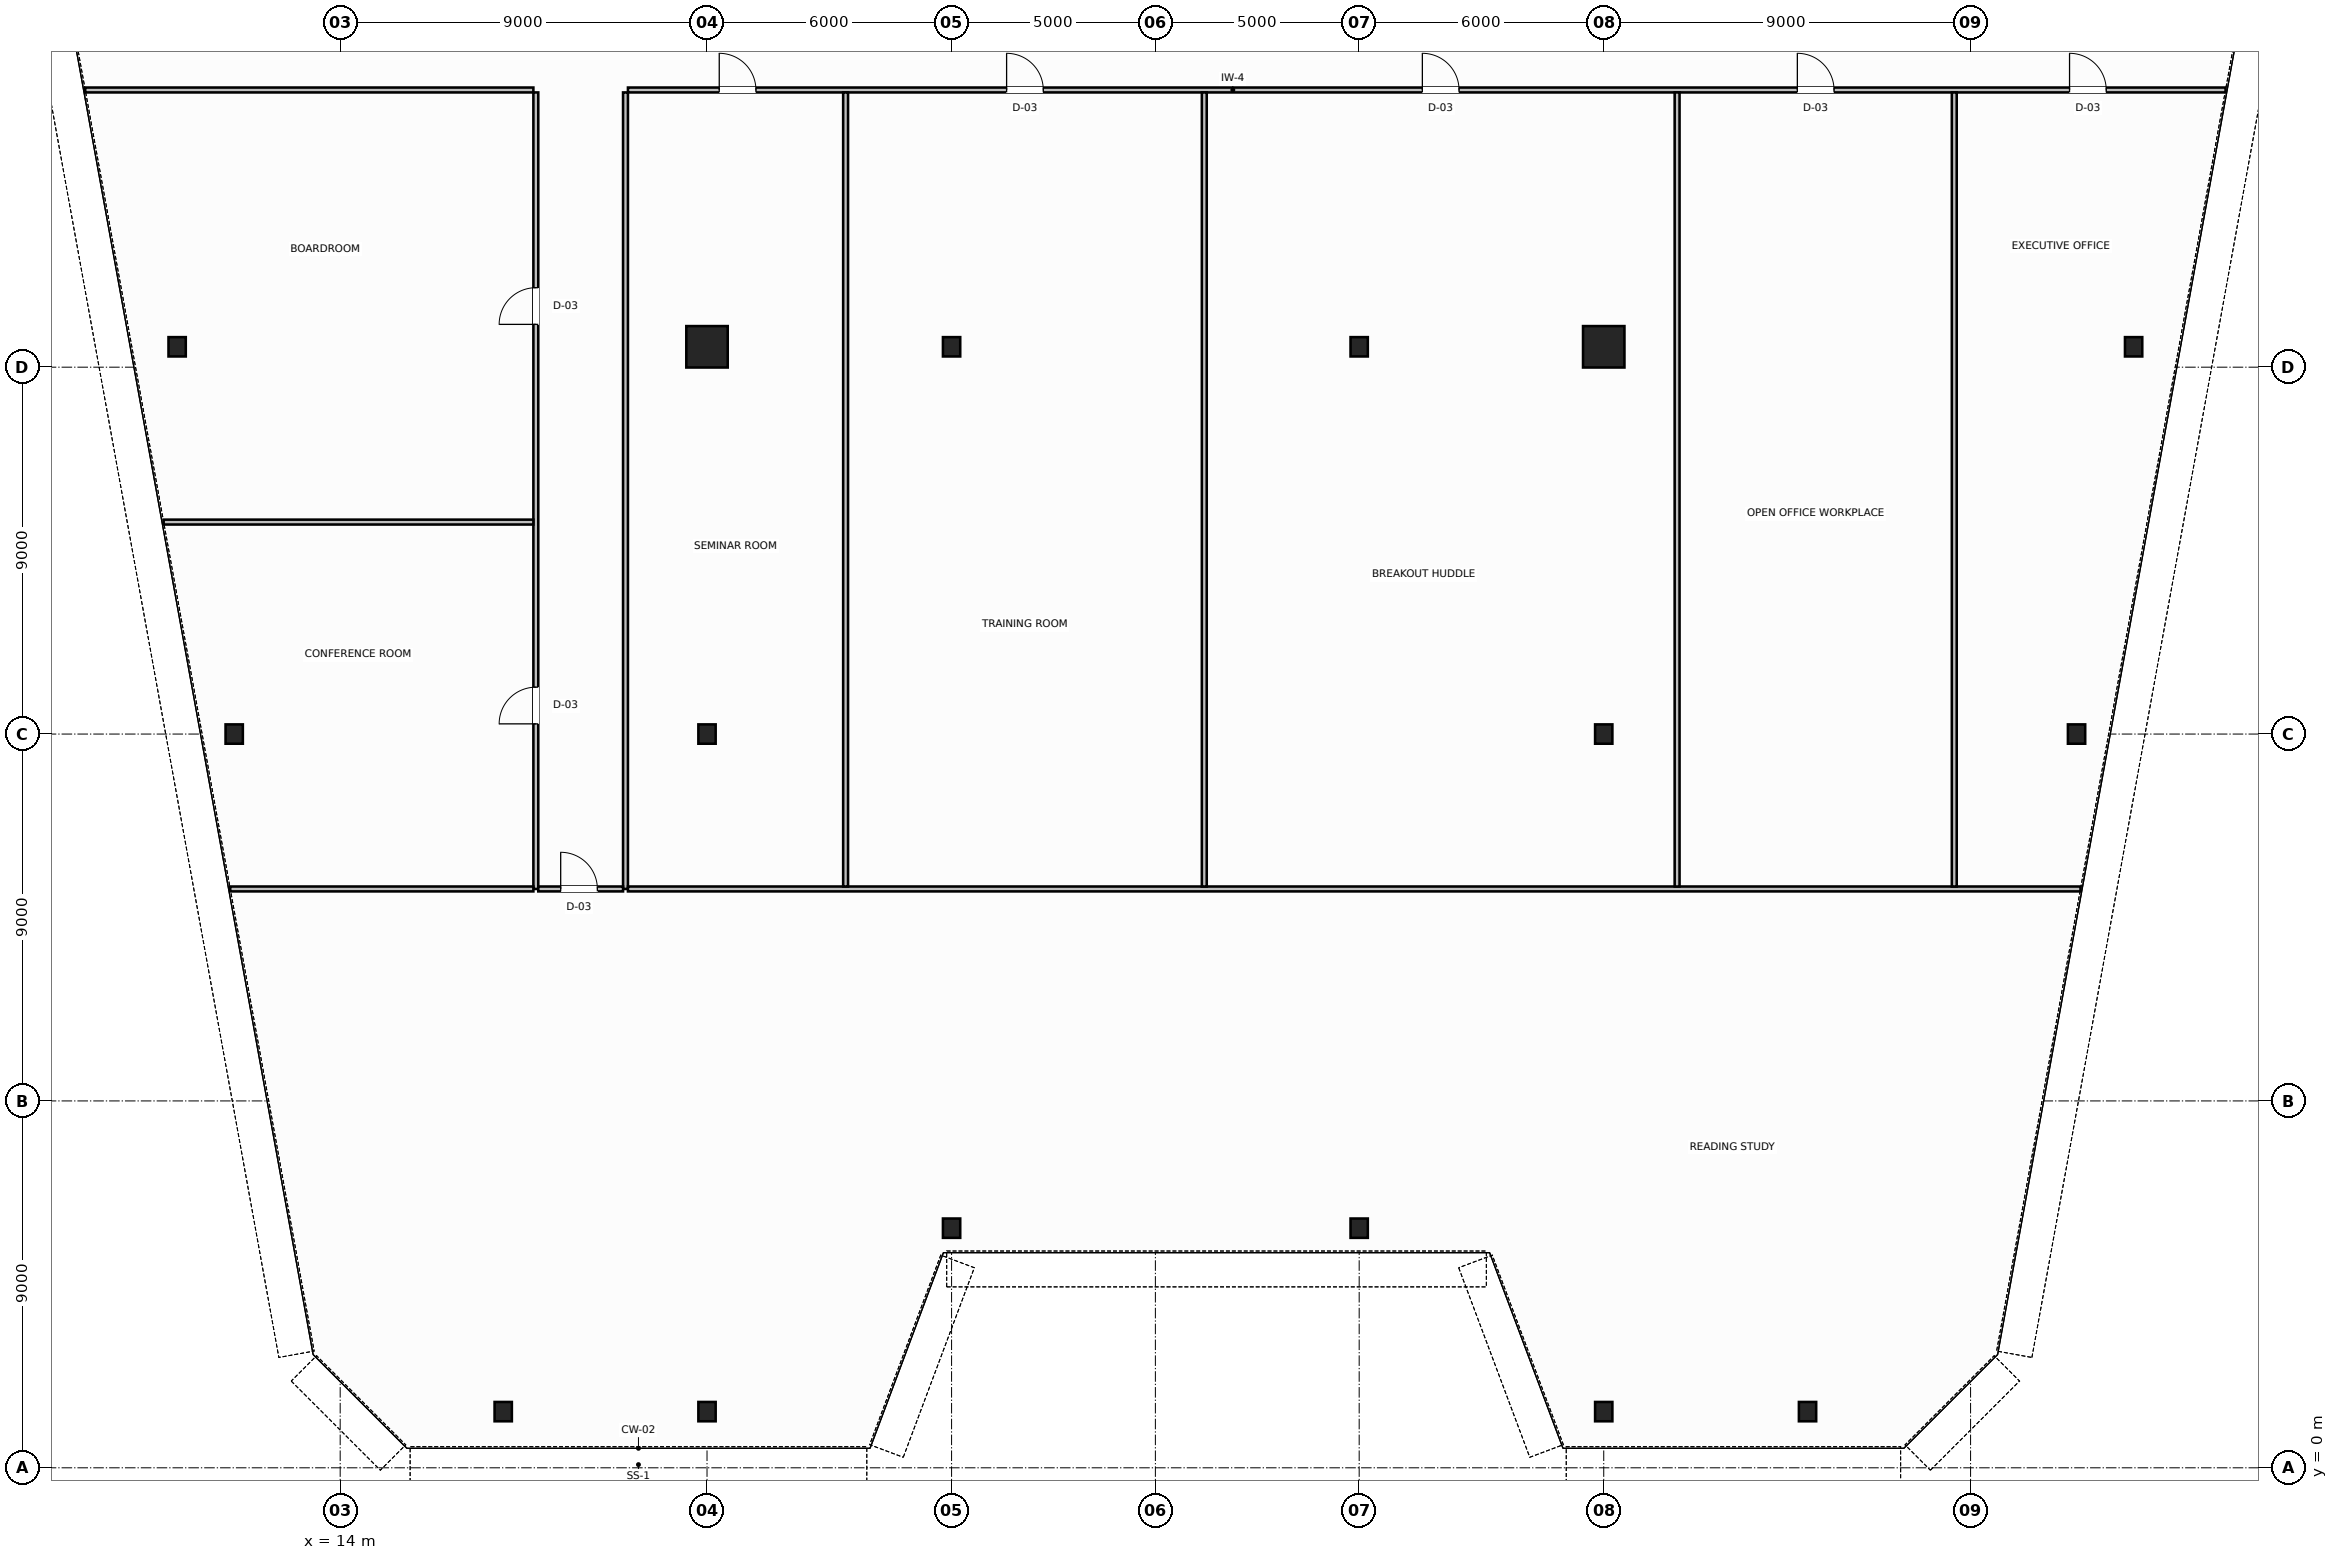
"""IFC4 building model, lengths in metres.
Left out: names, types, materials, properties, quantities, classifications, styles, units other than length and angle.
Written with IfcOpenShell. Run it as: python <this file> out.ifc"""

import sys

from ifc_helpers import new_model, si_unit, direction, frame, frame_2d, origin, origin_2d, place, context, subcontext, project, spatial, rectangle, hollow_circle, i_section, extrude, source, transform, mapped, element, fill, save


model = new_model("IFC4")
c1 = context("Model", 3, precision=1e-05, world=origin(), true_north=direction((0.0, 1.0)))
c2 = subcontext(c1, "Body", "Model", "MODEL_VIEW")
j1 = project(units=[si_unit("LENGTHUNIT", "METRE"), si_unit("PLANEANGLEUNIT", "RADIAN")], contexts=[c1])
p1 = place(None, origin())
s1 = spatial("IfcSite", under=j1, at=p1, CompositionType="ELEMENT")
p2 = place(p1, origin())
s2 = spatial("IfcBuilding", under=s1, at=p2, CompositionType="ELEMENT")
p3 = place(p2, frame((0.0, 0.0, 137.6)))
s3 = spatial("IfcBuildingStorey", under=s2, at=p3, CompositionType="ELEMENT", Elevation=137.6)
m1 = source(origin(), c2, "Body", "SweptSolid", [
    extrude(i_section(OverallWidth=0.424, OverallDepth=0.474, WebThickness=0.047, FlangeThickness=0.065, FilletRadius=0.015, at=origin_2d()), origin(), (0.0, 0.0, 1.0), 3.8),
])
for number, where, z_axis, x_axis in (
    (1, (10.0, 27.5, 0.0), (0.0, 0.0, 1.0), (1.0, 0.0, 0.0)),
    (2, (11.4, 18.0, 0.0), (0.0, 0.0, 1.0), (1.0, 0.0, 0.0)),
    (3, (58.0, 27.5, 0.0), (0.0, 0.0, 1.0), (1.0, 0.0, 0.0)),
    (4, (56.6, 18.0, 0.0), (0.0, 0.0, 1.0), (1.0, 0.0, 0.0)),
):
    element("IfcColumn", number, at=place(p3, frame(where, z_axis=z_axis, x_axis=x_axis)), inside=s3, PredefinedType="COLUMN", context=c2, shape_type="MappedRepresentation", body=[
        mapped(m1, transform((0.0, 0.0, 0.0), scale=1.0)),
    ])
m2 = source(origin(), c2, "Body", "SweptSolid", [
    extrude(hollow_circle(Radius=0.508, WallThickness=0.045, at=origin_2d()), origin(), (0.0, 0.0, 1.0), 3.8),
])
p4 = place(p3, frame((23.0, 27.5, 0.0), z_axis=(0.0, 0.0, 1.0), x_axis=(1.0, 0.0, 0.0)))
e5 = element("IfcColumn", 5, at=p4, inside=s3, PredefinedType="COLUMN", context=c2, shape_type="MappedRepresentation", body=[
    mapped(m2, transform((0.0, 0.0, 0.0), scale=1.0)),
])
m3 = source(origin(), c2, "Body", "SweptSolid", [
    extrude(i_section(OverallWidth=0.424, OverallDepth=0.474, WebThickness=0.047, FlangeThickness=0.065, FilletRadius=0.015, at=origin_2d()), origin(), (0.0, 0.0, 1.0), 3.8),
])
for number, where, z_axis, x_axis in (
    (6, (29.0, 27.5, 0.0), (0.0, 0.0, 1.0), (1.0, 0.0, 0.0)),
    (7, (39.0, 27.5, 0.0), (0.0, 0.0, 1.0), (1.0, 0.0, 0.0)),
):
    element("IfcColumn", number, at=place(p3, frame(where, z_axis=z_axis, x_axis=x_axis)), inside=s3, PredefinedType="COLUMN", context=c2, shape_type="MappedRepresentation", body=[
        mapped(m3, transform((0.0, 0.0, 0.0), scale=1.0)),
    ])
p5 = place(p3, frame((45.0, 27.5, 0.0), z_axis=(0.0, 0.0, 1.0), x_axis=(1.0, 0.0, 0.0)))
e8 = element("IfcColumn", 8, at=p5, inside=s3, PredefinedType="COLUMN", context=c2, shape_type="MappedRepresentation", body=[
    mapped(m2, transform((0.0, 0.0, 0.0), scale=1.0)),
])
for number, where, z_axis, x_axis in (
    (9, (23.0, 18.0, 0.0), (0.0, 0.0, 1.0), (1.0, 0.0, 0.0)),
    (10, (45.0, 18.0, 0.0), (0.0, 0.0, 1.0), (1.0, 0.0, 0.0)),
):
    element("IfcColumn", number, at=place(p3, frame(where, z_axis=z_axis, x_axis=x_axis)), inside=s3, PredefinedType="COLUMN", context=c2, shape_type="MappedRepresentation", body=[
        mapped(m3, transform((0.0, 0.0, 0.0), scale=1.0)),
    ])
m4 = source(origin(), c2, "Body", "SweptSolid", [
    extrude(i_section(OverallWidth=0.424, OverallDepth=0.474, WebThickness=0.047, FlangeThickness=0.065, FilletRadius=0.015, at=origin_2d()), origin(), (0.0, 0.0, 1.0), 3.743),
])
for number, where, z_axis, x_axis in (
    (11, (18.0, 1.378, 0.032), (0.0, -0.064, 0.998), (1.0, 0.0, 0.0)),
    (12, (23.0, 1.378, 0.032), (0.0, -0.064, 0.998), (1.0, 0.0, 0.0)),
    (13, (29.0, 5.878, 0.032), (0.0, -0.064, 0.998), (1.0, 0.0, 0.0)),
    (14, (39.0, 5.878, 0.032), (0.0, -0.064, 0.998), (1.0, 0.0, 0.0)),
    (15, (45.0, 1.378, 0.032), (0.0, -0.064, 0.998), (1.0, 0.0, 0.0)),
    (16, (50.0, 1.378, 0.032), (0.0, -0.064, 0.998), (1.0, 0.0, 0.0)),
):
    element("IfcColumn", number, at=place(p3, frame(where, z_axis=z_axis, x_axis=x_axis)), inside=s3, PredefinedType="COLUMN", context=c2, shape_type="MappedRepresentation", body=[
        mapped(m4, transform((0.0, 0.0, 0.0), scale=1.0)),
    ])
p6 = place(p3, frame((7.745, 33.8, 0.0), z_axis=(0.0, 0.0, 1.0), x_axis=(1.0, 0.0, 0.0)))
e17 = element("IfcWall", 17, at=p6, inside=s3, PredefinedType="PARTITIONING", context=c2, shape_type="SweptSolid", body=[
    extrude(rectangle(XDim=10.995, YDim=0.12, at=frame_2d((5.498, 0.0))), origin(), (0.0, 0.0, 1.0), 3.12),
])
p7 = place(p3, frame((21.06, 33.8, 0.0), z_axis=(0.0, 0.0, 1.0), x_axis=(1.0, 0.0, 0.0)))
e18 = element("IfcWall", 18, at=p7, inside=s3, PredefinedType="PARTITIONING", context=c2, shape_type="SweptSolid", body=[
    extrude(rectangle(XDim=39.195, YDim=0.12, at=frame_2d((19.598, 0.0))), origin(), (0.0, 0.0, 1.0), 3.12),
])
p8 = place(p7, frame((2.24, 0.0, 0.0)))
e19 = element("IfcOpeningElement", 19, at=p8, cuts=e18, PredefinedType="OPENING", context=c2, shape_type="SweptSolid", body=[
    extrude(rectangle(XDim=0.9, YDim=2.15, at=frame_2d((0.45, 1.075))), frame((0.0, 0.07, 0.0), z_axis=(0.0, -1.0, 0.0), x_axis=(1.0, 0.0, 0.0)), (0.0, 0.0, 1.0), 0.14),
])
p9 = place(p7, frame((9.29, 0.0, 0.0)))
e20 = element("IfcOpeningElement", 20, at=p9, cuts=e18, PredefinedType="OPENING", context=c2, shape_type="SweptSolid", body=[
    extrude(rectangle(XDim=0.9, YDim=2.15, at=frame_2d((0.45, 1.075))), frame((0.0, 0.07, 0.0), z_axis=(0.0, -1.0, 0.0), x_axis=(1.0, 0.0, 0.0)), (0.0, 0.0, 1.0), 0.14),
])
p10 = place(p7, frame((19.49, 0.0, 0.0)))
e21 = element("IfcOpeningElement", 21, at=p10, cuts=e18, PredefinedType="OPENING", context=c2, shape_type="SweptSolid", body=[
    extrude(rectangle(XDim=0.9, YDim=2.15, at=frame_2d((0.45, 1.075))), frame((0.0, 0.07, 0.0), z_axis=(0.0, -1.0, 0.0), x_axis=(1.0, 0.0, 0.0)), (0.0, 0.0, 1.0), 0.14),
])
p11 = place(p7, frame((28.69, 0.0, 0.0)))
e22 = element("IfcOpeningElement", 22, at=p11, cuts=e18, PredefinedType="OPENING", context=c2, shape_type="SweptSolid", body=[
    extrude(rectangle(XDim=0.9, YDim=2.15, at=frame_2d((0.45, 1.075))), frame((0.0, 0.07, 0.0), z_axis=(0.0, -1.0, 0.0), x_axis=(1.0, 0.0, 0.0)), (0.0, 0.0, 1.0), 0.14),
])
p12 = place(p7, frame((35.368, 0.0, 0.0)))
e23 = element("IfcOpeningElement", 23, at=p12, cuts=e18, PredefinedType="OPENING", context=c2, shape_type="SweptSolid", body=[
    extrude(rectangle(XDim=0.9, YDim=2.15, at=frame_2d((0.45, 1.075))), frame((0.0, 0.07, 0.0), z_axis=(0.0, -1.0, 0.0), x_axis=(1.0, 0.0, 0.0)), (0.0, 0.0, 1.0), 0.14),
])
p13 = place(p3, frame((18.8, 14.2, 0.0), z_axis=(0.0, 0.0, 1.0), x_axis=(0.0, 1.0, 0.0)))
e24 = element("IfcWall", 24, at=p13, inside=s3, PredefinedType="PARTITIONING", context=c2, shape_type="SweptSolid", body=[
    extrude(rectangle(XDim=19.54, YDim=0.12, at=frame_2d((9.77, 0.0))), origin(), (0.0, 0.0, 1.0), 3.58),
])
p14 = place(p13, frame((4.05, 0.0, 0.0)))
e25 = element("IfcOpeningElement", 25, at=p14, cuts=e24, PredefinedType="OPENING", context=c2, shape_type="SweptSolid", body=[
    extrude(rectangle(XDim=0.9, YDim=2.15, at=frame_2d((0.45, 1.075))), frame((0.0, 0.07, 0.0), z_axis=(0.0, -1.0, 0.0), x_axis=(1.0, 0.0, 0.0)), (0.0, 0.0, 1.0), 0.14),
])
p15 = place(p13, frame((13.85, 0.0, 0.0)))
e26 = element("IfcOpeningElement", 26, at=p15, cuts=e24, PredefinedType="OPENING", context=c2, shape_type="SweptSolid", body=[
    extrude(rectangle(XDim=0.9, YDim=2.15, at=frame_2d((0.45, 1.075))), frame((0.0, 0.07, 0.0), z_axis=(0.0, -1.0, 0.0), x_axis=(1.0, 0.0, 0.0)), (0.0, 0.0, 1.0), 0.14),
])
p16 = place(p3, frame((21.0, 14.2, 0.0), z_axis=(0.0, 0.0, 1.0), x_axis=(0.0, 1.0, 0.0)))
e27 = element("IfcWall", 27, at=p16, inside=s3, PredefinedType="PARTITIONING", context=c2, shape_type="SweptSolid", body=[
    extrude(rectangle(XDim=19.54, YDim=0.12, at=frame_2d((9.77, 0.0))), origin(), (0.0, 0.0, 1.0), 3.58),
])
p17 = place(p3, frame((18.86, 14.2, 0.0), z_axis=(0.0, 0.0, 1.0), x_axis=(1.0, 0.0, 0.0)))
e28 = element("IfcWall", 28, at=p17, inside=s3, PredefinedType="PARTITIONING", context=c2, shape_type="SweptSolid", body=[
    extrude(rectangle(XDim=2.08, YDim=0.12, at=frame_2d((1.04, 0.0))), origin(), (0.0, 0.0, 1.0), 3.58),
])
p18 = place(p17, frame((0.55, 0.0, 0.0)))
e29 = element("IfcOpeningElement", 29, at=p18, cuts=e28, PredefinedType="OPENING", context=c2, shape_type="SweptSolid", body=[
    extrude(rectangle(XDim=0.9, YDim=2.15, at=frame_2d((0.45, 1.075))), frame((0.0, 0.07, 0.0), z_axis=(0.0, -1.0, 0.0), x_axis=(1.0, 0.0, 0.0)), (0.0, 0.0, 1.0), 0.14),
])
p19 = place(p3, frame((11.303, 14.2, 0.0), z_axis=(0.0, 0.0, 1.0), x_axis=(1.0, 0.0, 0.0)))
e30 = element("IfcWall", 30, at=p19, inside=s3, PredefinedType="PARTITIONING", context=c2, shape_type="SweptSolid", body=[
    extrude(rectangle(XDim=7.437, YDim=0.12, at=frame_2d((3.719, 0.0))), origin(), (0.0, 0.0, 1.0), 3.58),
])
p20 = place(p3, frame((21.06, 14.2, 0.0), z_axis=(0.0, 0.0, 1.0), x_axis=(1.0, 0.0, 0.0)))
e31 = element("IfcWall", 31, at=p20, inside=s3, PredefinedType="PARTITIONING", context=c2, shape_type="SweptSolid", body=[
    extrude(rectangle(XDim=35.637, YDim=0.12, at=frame_2d((17.819, 0.0))), origin(), (0.0, 0.0, 1.0), 3.58),
])
p21 = place(p3, frame((9.669, 23.2, 0.0), z_axis=(0.0, 0.0, 1.0), x_axis=(1.0, 0.0, 0.0)))
e32 = element("IfcWall", 32, at=p21, inside=s3, PredefinedType="PARTITIONING", context=c2, shape_type="SweptSolid", body=[
    extrude(rectangle(XDim=9.071, YDim=0.12, at=frame_2d((4.536, 0.0))), origin(), (0.0, 0.0, 1.0), 3.58),
])
for number, where, z_axis, x_axis in (
    (33, (26.4, 14.26, 0.0), (0.0, 0.0, 1.0), (0.0, 1.0, 0.0)),
    (34, (35.2, 14.26, 0.0), (0.0, 0.0, 1.0), (0.0, 1.0, 0.0)),
    (35, (46.8, 14.26, 0.0), (0.0, 0.0, 1.0), (0.0, 1.0, 0.0)),
    (36, (53.6, 14.26, 0.0), (0.0, 0.0, 1.0), (0.0, 1.0, 0.0)),
):
    element("IfcWall", number, at=place(p3, frame(where, z_axis=z_axis, x_axis=x_axis)), inside=s3, PredefinedType="PARTITIONING", context=c2, shape_type="SweptSolid", body=[
        extrude(rectangle(XDim=19.48, YDim=0.12, at=frame_2d((9.74, 0.0))), origin(), (0.0, 0.0, 1.0), 3.58),
    ])
m5 = source(origin(), c2, "Body", "SweptSolid", [
    extrude(rectangle(XDim=0.9, YDim=2.15, at=frame_2d((0.45, 1.075))), frame((0.0, 0.025, 0.0), z_axis=(0.0, -1.0, 0.0), x_axis=(1.0, 0.0, 0.0)), (0.0, 0.0, 1.0), 0.05),
])
p22 = place(p18, origin())
e37 = element("IfcDoor", 37, at=p22, inside=s3, OperationType="SINGLE_SWING_LEFT", PredefinedType="DOOR", context=c2, shape_type="MappedRepresentation", body=[
    mapped(m5, transform((0.0, 0.0, 0.0), scale=1.0)),
])
fill(e29, e37)
p23 = place(p14, origin())
e38 = element("IfcDoor", 38, at=p23, inside=s3, OperationType="SINGLE_SWING_LEFT", PredefinedType="DOOR", context=c2, shape_type="MappedRepresentation", body=[
    mapped(m5, transform((0.0, 0.0, 0.0), scale=1.0)),
])
fill(e25, e38)
p24 = place(p15, origin())
e39 = element("IfcDoor", 39, at=p24, inside=s3, OperationType="SINGLE_SWING_RIGHT", PredefinedType="DOOR", context=c2, shape_type="MappedRepresentation", body=[
    mapped(m5, transform((0.0, 0.0, 0.0), scale=1.0)),
])
fill(e26, e39)
p25 = place(p8, origin())
e40 = element("IfcDoor", 40, at=p25, inside=s3, OperationType="SINGLE_SWING_RIGHT", PredefinedType="DOOR", context=c2, shape_type="MappedRepresentation", body=[
    mapped(m5, transform((0.0, 0.0, 0.0), scale=1.0)),
])
fill(e19, e40)
p26 = place(p9, origin())
e41 = element("IfcDoor", 41, at=p26, inside=s3, OperationType="SINGLE_SWING_LEFT", PredefinedType="DOOR", context=c2, shape_type="MappedRepresentation", body=[
    mapped(m5, transform((0.0, 0.0, 0.0), scale=1.0)),
])
fill(e20, e41)
p27 = place(p10, origin())
e42 = element("IfcDoor", 42, at=p27, inside=s3, OperationType="SINGLE_SWING_RIGHT", PredefinedType="DOOR", context=c2, shape_type="MappedRepresentation", body=[
    mapped(m5, transform((0.0, 0.0, 0.0), scale=1.0)),
])
fill(e21, e42)
p28 = place(p11, origin())
e43 = element("IfcDoor", 43, at=p28, inside=s3, OperationType="SINGLE_SWING_LEFT", PredefinedType="DOOR", context=c2, shape_type="MappedRepresentation", body=[
    mapped(m5, transform((0.0, 0.0, 0.0), scale=1.0)),
])
fill(e22, e43)
p29 = place(p12, origin())
e44 = element("IfcDoor", 44, at=p29, inside=s3, OperationType="SINGLE_SWING_RIGHT", PredefinedType="DOOR", context=c2, shape_type="MappedRepresentation", body=[
    mapped(m5, transform((0.0, 0.0, 0.0), scale=1.0)),
])
fill(e23, e44)
save(model, sys.argv[1])
